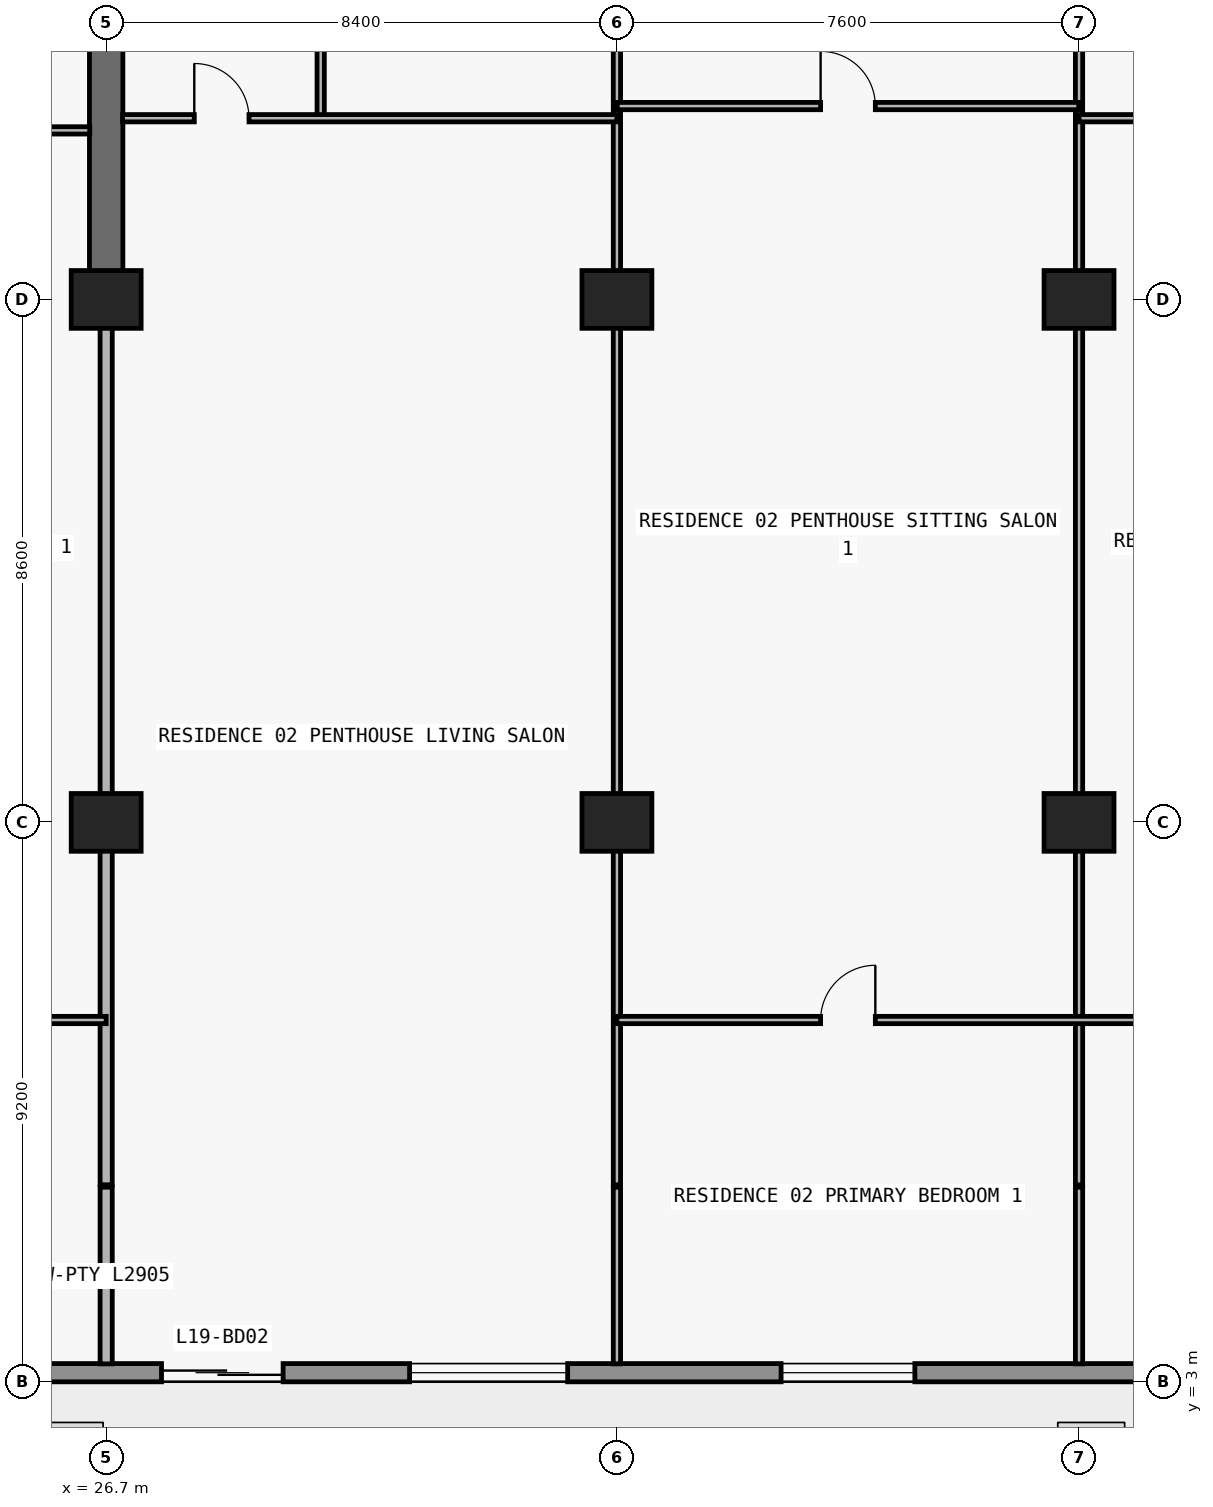
"""IFC4 building model, lengths in metres.
Left out: names, types, materials, properties, quantities, classifications, styles, units other than length and angle.
Written with IfcOpenShell. Run it as: python <this file> out.ifc"""

import sys

from ifc_helpers import new_model, si_unit, direction, frame, frame_2d, origin, origin_2d, place, context, subcontext, project, spatial, rectangle, extrude, element, fill, save


model = new_model("IFC4")
c1 = context("Model", 3, precision=1e-05, world=origin(), true_north=direction((0.0, 1.0)))
c2 = subcontext(c1, "Body", "Model", "MODEL_VIEW")
j1 = project(units=[si_unit("LENGTHUNIT", "METRE"), si_unit("PLANEANGLEUNIT", "RADIAN")], contexts=[c1])
p1 = place(None, origin())
s1 = spatial("IfcSite", under=j1, at=p1, CompositionType="ELEMENT")
p2 = place(p1, origin())
s2 = spatial("IfcBuilding", under=s1, at=p2, CompositionType="ELEMENT")
p3 = place(p2, frame((0.0, 0.0, 72.9)))
s3 = spatial("IfcBuildingStorey", under=s2, at=p3, CompositionType="ELEMENT", Elevation=72.9)
for number, where, z_axis, x_axis in (
    (1, (26.7, 12.2, 0.0), (0.0, 0.0, 1.0), (1.0, 0.0, 0.0)),
    (2, (35.1, 12.2, 0.0), (0.0, 0.0, 1.0), (1.0, 0.0, 0.0)),
    (3, (42.7, 12.2, 0.0), (0.0, 0.0, 1.0), (1.0, 0.0, 0.0)),
    (4, (26.7, 20.8, 0.0), (0.0, 0.0, 1.0), (1.0, 0.0, 0.0)),
    (5, (35.1, 20.8, 0.0), (0.0, 0.0, 1.0), (1.0, 0.0, 0.0)),
    (6, (42.7, 20.8, 0.0), (0.0, 0.0, 1.0), (1.0, 0.0, 0.0)),
):
    element("IfcColumn", number, at=place(p3, frame(where, z_axis=z_axis, x_axis=x_axis)), inside=s3, PredefinedType="COLUMN", context=c2, shape_type="SweptSolid", body=[
        extrude(rectangle(XDim=1.15, YDim=0.95, at=origin_2d()), origin(), (0.0, 0.0, 1.0), 3.05),
    ])
p4 = place(p3, frame((26.7, 20.8, 0.0), z_axis=(0.0, 0.0, 1.0), x_axis=(0.0, 1.0, 0.0)))
e7 = element("IfcWall", 7, at=p4, inside=s3, PredefinedType="SHEAR", context=c2, shape_type="SweptSolid", body=[
    extrude(rectangle(XDim=8.6, YDim=0.55, at=frame_2d((4.3, 0.0))), origin(), (0.0, 0.0, 1.0), 3.05),
])
p5 = place(p3, frame((72.7, 3.15, 0.0), z_axis=(0.0, 0.0, 1.0), x_axis=(-1.0, 0.0, 0.0)))
e8 = element("IfcWall", 8, at=p5, inside=s3, PredefinedType="STANDARD", context=c2, shape_type="SweptSolid", body=[
    extrude(rectangle(XDim=67.6, YDim=0.3, at=frame_2d((33.8, 0.0))), origin(), (0.0, 0.0, 1.0), 3.05),
])
p6 = place(p5, frame((59.89, 0.0, 0.0)))
e9 = element("IfcOpeningElement", 9, at=p6, cuts=e8, PredefinedType="OPENING", context=c2, shape_type="SweptSolid", body=[
    extrude(rectangle(XDim=2.0, YDim=2.3, at=frame_2d((1.0, 1.15))), frame((0.0, 0.16, 0.0), z_axis=(0.0, -1.0, 0.0), x_axis=(1.0, 0.0, 0.0)), (0.0, 0.0, 1.0), 0.32),
])
p7 = place(p5, frame((55.21, 0.0, 0.65)))
e10 = element("IfcOpeningElement", 10, at=p7, cuts=e8, PredefinedType="OPENING", context=c2, shape_type="SweptSolid", body=[
    extrude(rectangle(XDim=2.6, YDim=1.85, at=frame_2d((1.3, 0.925))), frame((0.0, 0.16, 0.0), z_axis=(0.0, -1.0, 0.0), x_axis=(1.0, 0.0, 0.0)), (0.0, 0.0, 1.0), 0.32),
])
p8 = place(p5, frame((49.1, 0.0, 0.85)))
e11 = element("IfcOpeningElement", 11, at=p8, cuts=e8, PredefinedType="OPENING", context=c2, shape_type="SweptSolid", body=[
    extrude(rectangle(XDim=2.2, YDim=1.55, at=frame_2d((1.1, 0.775))), frame((0.0, 0.16, 0.0), z_axis=(0.0, -1.0, 0.0), x_axis=(1.0, 0.0, 0.0)), (0.0, 0.0, 1.0), 0.32),
])
p9 = place(p5, frame((43.09, 0.0, 0.0)))
e12 = element("IfcOpeningElement", 12, at=p9, cuts=e8, PredefinedType="OPENING", context=c2, shape_type="SweptSolid", body=[
    extrude(rectangle(XDim=2.0, YDim=2.3, at=frame_2d((1.0, 1.15))), frame((0.0, 0.16, 0.0), z_axis=(0.0, -1.0, 0.0), x_axis=(1.0, 0.0, 0.0)), (0.0, 0.0, 1.0), 0.32),
])
p10 = place(p5, frame((38.41, 0.0, 0.65)))
e13 = element("IfcOpeningElement", 13, at=p10, cuts=e8, PredefinedType="OPENING", context=c2, shape_type="SweptSolid", body=[
    extrude(rectangle(XDim=2.6, YDim=1.85, at=frame_2d((1.3, 0.925))), frame((0.0, 0.16, 0.0), z_axis=(0.0, -1.0, 0.0), x_axis=(1.0, 0.0, 0.0)), (0.0, 0.0, 1.0), 0.32),
])
p11 = place(p5, frame((32.7, 0.0, 0.85)))
e14 = element("IfcOpeningElement", 14, at=p11, cuts=e8, PredefinedType="OPENING", context=c2, shape_type="SweptSolid", body=[
    extrude(rectangle(XDim=2.2, YDim=1.55, at=frame_2d((1.1, 0.775))), frame((0.0, 0.16, 0.0), z_axis=(0.0, -1.0, 0.0), x_axis=(1.0, 0.0, 0.0)), (0.0, 0.0, 1.0), 0.32),
])
p12 = place(p5, frame((24.7, 0.0, 0.85)))
e15 = element("IfcOpeningElement", 15, at=p12, cuts=e8, PredefinedType="OPENING", context=c2, shape_type="SweptSolid", body=[
    extrude(rectangle(XDim=2.2, YDim=1.55, at=frame_2d((1.1, 0.775))), frame((0.0, 0.16, 0.0), z_axis=(0.0, -1.0, 0.0), x_axis=(1.0, 0.0, 0.0)), (0.0, 0.0, 1.0), 0.32),
])
p13 = place(p5, frame((18.69, 0.0, 0.0)))
e16 = element("IfcOpeningElement", 16, at=p13, cuts=e8, PredefinedType="OPENING", context=c2, shape_type="SweptSolid", body=[
    extrude(rectangle(XDim=2.0, YDim=2.3, at=frame_2d((1.0, 1.15))), frame((0.0, 0.16, 0.0), z_axis=(0.0, -1.0, 0.0), x_axis=(1.0, 0.0, 0.0)), (0.0, 0.0, 1.0), 0.32),
])
p14 = place(p5, frame((14.01, 0.0, 0.65)))
e17 = element("IfcOpeningElement", 17, at=p14, cuts=e8, PredefinedType="OPENING", context=c2, shape_type="SweptSolid", body=[
    extrude(rectangle(XDim=2.6, YDim=1.85, at=frame_2d((1.3, 0.925))), frame((0.0, 0.16, 0.0), z_axis=(0.0, -1.0, 0.0), x_axis=(1.0, 0.0, 0.0)), (0.0, 0.0, 1.0), 0.32),
])
p15 = place(p5, frame((7.9, 0.0, 0.85)))
e18 = element("IfcOpeningElement", 18, at=p15, cuts=e8, PredefinedType="OPENING", context=c2, shape_type="SweptSolid", body=[
    extrude(rectangle(XDim=2.2, YDim=1.55, at=frame_2d((1.1, 0.775))), frame((0.0, 0.16, 0.0), z_axis=(0.0, -1.0, 0.0), x_axis=(1.0, 0.0, 0.0)), (0.0, 0.0, 1.0), 0.32),
])
p16 = place(p3, frame((26.7, 3.295, 0.0), z_axis=(0.0, 0.0, 1.0), x_axis=(0.0, 1.0, 0.0)))
e19 = element("IfcWall", 19, at=p16, inside=s3, PredefinedType="PARTITIONING", context=c2, shape_type="SweptSolid", body=[
    extrude(rectangle(XDim=2.905, YDim=0.2, at=frame_2d((1.453, 0.0))), origin(), (0.0, 0.0, 1.0), 3.05),
])
p17 = place(p3, frame((26.7, 6.24, 0.0), z_axis=(0.0, 0.0, 1.0), x_axis=(0.0, 1.0, 0.0)))
e20 = element("IfcWall", 20, at=p17, inside=s3, PredefinedType="PARTITIONING", context=c2, shape_type="SweptSolid", body=[
    extrude(rectangle(XDim=14.555, YDim=0.2, at=frame_2d((7.277, 0.0))), origin(), (0.0, 0.0, 1.0), 2.11),
])
p18 = place(p3, frame((30.228, 23.78, 0.0), z_axis=(0.0, 0.0, 1.0), x_axis=(0.0, 1.0, 0.0)))
e21 = element("IfcWall", 21, at=p18, inside=s3, PredefinedType="PARTITIONING", context=c2, shape_type="SweptSolid", body=[
    extrude(rectangle(XDim=4.8, YDim=0.12, at=frame_2d((2.4, 0.0))), origin(), (0.0, 0.0, 1.0), 3.05),
])
p19 = place(p18, frame((1.95, 0.0, 0.0)))
e22 = element("IfcOpeningElement", 22, at=p19, cuts=e21, PredefinedType="OPENING", context=c2, shape_type="SweptSolid", body=[
    extrude(rectangle(XDim=0.9, YDim=2.15, at=frame_2d((0.45, 1.075))), frame((0.0, 0.07, 0.0), z_axis=(0.0, -1.0, 0.0), x_axis=(1.0, 0.0, 0.0)), (0.0, 0.0, 1.0), 0.14),
])
p20 = place(p3, frame((35.1, 3.295, 0.0), z_axis=(0.0, 0.0, 1.0), x_axis=(0.0, 1.0, 0.0)))
e23 = element("IfcWall", 23, at=p20, inside=s3, PredefinedType="PARTITIONING", context=c2, shape_type="SweptSolid", body=[
    extrude(rectangle(XDim=2.905, YDim=0.12, at=frame_2d((1.453, 0.0))), origin(), (0.0, 0.0, 1.0), 3.05),
])
p21 = place(p3, frame((35.1, 6.24, 0.0), z_axis=(0.0, 0.0, 1.0), x_axis=(0.0, 1.0, 0.0)))
e24 = element("IfcWall", 24, at=p21, inside=s3, PredefinedType="PARTITIONING", context=c2, shape_type="SweptSolid", body=[
    extrude(rectangle(XDim=27.96, YDim=0.12, at=frame_2d((13.98, 0.0))), origin(), (0.0, 0.0, 1.0), 2.11),
])
p22 = place(p21, frame((19.49, 0.0, 0.0)))
e25 = element("IfcOpeningElement", 25, at=p22, cuts=e24, PredefinedType="OPENING", context=c2, shape_type="SweptSolid", body=[
    extrude(rectangle(XDim=0.9, YDim=2.06, at=frame_2d((0.45, 1.03))), frame((0.0, 0.07, 0.0), z_axis=(0.0, -1.0, 0.0), x_axis=(1.0, 0.0, 0.0)), (0.0, 0.0, 1.0), 0.14),
])
p23 = place(p3, frame((42.7, 3.295, 0.0), z_axis=(0.0, 0.0, 1.0), x_axis=(0.0, 1.0, 0.0)))
e26 = element("IfcWall", 26, at=p23, inside=s3, PredefinedType="PARTITIONING", context=c2, shape_type="SweptSolid", body=[
    extrude(rectangle(XDim=2.905, YDim=0.12, at=frame_2d((1.453, 0.0))), origin(), (0.0, 0.0, 1.0), 3.05),
])
p24 = place(p3, frame((42.7, 6.24, 0.0), z_axis=(0.0, 0.0, 1.0), x_axis=(0.0, 1.0, 0.0)))
e27 = element("IfcWall", 27, at=p24, inside=s3, PredefinedType="PARTITIONING", context=c2, shape_type="SweptSolid", body=[
    extrude(rectangle(XDim=27.96, YDim=0.12, at=frame_2d((13.98, 0.0))), origin(), (0.0, 0.0, 1.0), 2.11),
])
p25 = place(p24, frame((19.49, 0.0, 0.0)))
e28 = element("IfcOpeningElement", 28, at=p25, cuts=e27, PredefinedType="OPENING", context=c2, shape_type="SweptSolid", body=[
    extrude(rectangle(XDim=0.9, YDim=2.06, at=frame_2d((0.45, 1.03))), frame((0.0, 0.07, 0.0), z_axis=(0.0, -1.0, 0.0), x_axis=(1.0, 0.0, 0.0)), (0.0, 0.0, 1.0), 0.14),
])
p26 = place(p3, frame((18.3, 8.95, 0.0), z_axis=(0.0, 0.0, 1.0), x_axis=(1.0, 0.0, 0.0)))
e29 = element("IfcWall", 29, at=p26, inside=s3, PredefinedType="PARTITIONING", context=c2, shape_type="SweptSolid", body=[
    extrude(rectangle(XDim=8.4, YDim=0.12, at=frame_2d((4.2, 0.0))), origin(), (0.0, 0.0, 1.0), 3.05),
])
p27 = place(p26, frame((3.75, 0.0, 0.0)))
e30 = element("IfcOpeningElement", 30, at=p27, cuts=e29, PredefinedType="OPENING", context=c2, shape_type="SweptSolid", body=[
    extrude(rectangle(XDim=0.9, YDim=2.15, at=frame_2d((0.45, 1.075))), frame((0.0, 0.07, 0.0), z_axis=(0.0, -1.0, 0.0), x_axis=(1.0, 0.0, 0.0)), (0.0, 0.0, 1.0), 0.14),
])
p28 = place(p3, frame((35.1, 8.95, 0.0), z_axis=(0.0, 0.0, 1.0), x_axis=(1.0, 0.0, 0.0)))
e31 = element("IfcWall", 31, at=p28, inside=s3, PredefinedType="PARTITIONING", context=c2, shape_type="SweptSolid", body=[
    extrude(rectangle(XDim=16.0, YDim=0.12, at=frame_2d((8.0, 0.0))), origin(), (0.0, 0.0, 1.0), 3.05),
])
p29 = place(p28, frame((3.35, 0.0, 0.0)))
e32 = element("IfcOpeningElement", 32, at=p29, cuts=e31, PredefinedType="OPENING", context=c2, shape_type="SweptSolid", body=[
    extrude(rectangle(XDim=0.9, YDim=2.15, at=frame_2d((0.45, 1.075))), frame((0.0, 0.07, 0.0), z_axis=(0.0, -1.0, 0.0), x_axis=(1.0, 0.0, 0.0)), (0.0, 0.0, 1.0), 0.14),
])
p30 = place(p28, frame((11.35, 0.0, 0.0)))
e33 = element("IfcOpeningElement", 33, at=p30, cuts=e31, PredefinedType="OPENING", context=c2, shape_type="SweptSolid", body=[
    extrude(rectangle(XDim=0.9, YDim=2.15, at=frame_2d((0.45, 1.075))), frame((0.0, 0.07, 0.0), z_axis=(0.0, -1.0, 0.0), x_axis=(1.0, 0.0, 0.0)), (0.0, 0.0, 1.0), 0.14),
])
p31 = place(p3, frame((18.305, 23.58, 0.0), z_axis=(0.0, 0.0, 1.0), x_axis=(1.0, 0.0, 0.0)))
e34 = element("IfcWall", 34, at=p31, inside=s3, PredefinedType="PARTITIONING", context=c2, shape_type="SweptSolid", body=[
    extrude(rectangle(XDim=8.125, YDim=0.12, at=frame_2d((4.062, 0.0))), origin(), (0.0, 0.0, 1.0), 3.05),
])
p32 = place(p31, frame((3.613, 0.0, 0.0)))
e35 = element("IfcOpeningElement", 35, at=p32, cuts=e34, PredefinedType="OPENING", context=c2, shape_type="SweptSolid", body=[
    extrude(rectangle(XDim=0.9, YDim=2.15, at=frame_2d((0.45, 1.075))), frame((0.0, 0.07, 0.0), z_axis=(0.0, -1.0, 0.0), x_axis=(1.0, 0.0, 0.0)), (0.0, 0.0, 1.0), 0.14),
])
p33 = place(p3, frame((26.97, 23.78, 0.0), z_axis=(0.0, 0.0, 1.0), x_axis=(1.0, 0.0, 0.0)))
e36 = element("IfcWall", 36, at=p33, inside=s3, PredefinedType="PARTITIONING", context=c2, shape_type="SweptSolid", body=[
    extrude(rectangle(XDim=8.13, YDim=0.12, at=frame_2d((4.065, 0.0))), origin(), (0.0, 0.0, 1.0), 3.05),
])
p34 = place(p33, frame((1.179, 0.0, 0.0)))
e37 = element("IfcOpeningElement", 37, at=p34, cuts=e36, PredefinedType="OPENING", context=c2, shape_type="SweptSolid", body=[
    extrude(rectangle(XDim=0.9, YDim=2.15, at=frame_2d((0.45, 1.075))), frame((0.0, 0.07, 0.0), z_axis=(0.0, -1.0, 0.0), x_axis=(1.0, 0.0, 0.0)), (0.0, 0.0, 1.0), 0.14),
])
p35 = place(p3, frame((42.7, 23.78, 0.0), z_axis=(0.0, 0.0, 1.0), x_axis=(1.0, 0.0, 0.0)))
e38 = element("IfcWall", 38, at=p35, inside=s3, PredefinedType="PARTITIONING", context=c2, shape_type="SweptSolid", body=[
    extrude(rectangle(XDim=8.13, YDim=0.12, at=frame_2d((4.065, 0.0))), origin(), (0.0, 0.0, 1.0), 3.05),
])
p36 = place(p35, frame((3.615, 0.0, 0.0)))
e39 = element("IfcOpeningElement", 39, at=p36, cuts=e38, PredefinedType="OPENING", context=c2, shape_type="SweptSolid", body=[
    extrude(rectangle(XDim=0.9, YDim=2.15, at=frame_2d((0.45, 1.075))), frame((0.0, 0.07, 0.0), z_axis=(0.0, -1.0, 0.0), x_axis=(1.0, 0.0, 0.0)), (0.0, 0.0, 1.0), 0.14),
])
p37 = place(p3, frame((35.105, 23.98, 0.0), z_axis=(0.0, 0.0, 1.0), x_axis=(1.0, 0.0, 0.0)))
e40 = element("IfcWall", 40, at=p37, inside=s3, PredefinedType="PARTITIONING", context=c2, shape_type="SweptSolid", body=[
    extrude(rectangle(XDim=7.59, YDim=0.12, at=frame_2d((3.795, 0.0))), origin(), (0.0, 0.0, 1.0), 3.05),
])
p38 = place(p37, frame((3.345, 0.0, 0.0)))
e41 = element("IfcOpeningElement", 41, at=p38, cuts=e40, PredefinedType="OPENING", context=c2, shape_type="SweptSolid", body=[
    extrude(rectangle(XDim=0.9, YDim=2.15, at=frame_2d((0.45, 1.075))), frame((0.0, 0.07, 0.0), z_axis=(0.0, -1.0, 0.0), x_axis=(1.0, 0.0, 0.0)), (0.0, 0.0, 1.0), 0.14),
])
p39 = place(p9, origin())
e42 = element("IfcDoor", 42, at=p39, inside=s3, OperationType="DOUBLE_DOOR_SLIDING", PredefinedType="DOOR", context=c2, shape_type="SweptSolid", body=[
    extrude(rectangle(XDim=2.0, YDim=2.3, at=frame_2d((1.0, 1.15))), frame((0.0, 0.025, 0.0), z_axis=(0.0, -1.0, 0.0), x_axis=(1.0, 0.0, 0.0)), (0.0, 0.0, 1.0), 0.05),
])
fill(e12, e42)
p40 = place(p10, origin())
e43 = element("IfcWindow", 43, at=p40, inside=s3, PartitioningType="SINGLE_PANEL", PredefinedType="WINDOW", context=c2, shape_type="SweptSolid", body=[
    extrude(rectangle(XDim=2.6, YDim=1.85, at=frame_2d((1.3, 0.925))), frame((0.0, 0.03, 0.0), z_axis=(0.0, -1.0, 0.0), x_axis=(1.0, 0.0, 0.0)), (0.0, 0.0, 1.0), 0.06),
])
fill(e13, e43)
p41 = place(p11, origin())
e44 = element("IfcWindow", 44, at=p41, inside=s3, PartitioningType="SINGLE_PANEL", PredefinedType="WINDOW", context=c2, shape_type="SweptSolid", body=[
    extrude(rectangle(XDim=2.2, YDim=1.55, at=frame_2d((1.1, 0.775))), frame((0.0, 0.03, 0.0), z_axis=(0.0, -1.0, 0.0), x_axis=(1.0, 0.0, 0.0)), (0.0, 0.0, 1.0), 0.06),
])
fill(e14, e44)
p42 = place(p34, origin())
e45 = element("IfcDoor", 45, at=p42, inside=s3, OperationType="SINGLE_SWING_LEFT", PredefinedType="DOOR", context=c2, shape_type="SweptSolid", body=[
    extrude(rectangle(XDim=0.9, YDim=2.15, at=frame_2d((0.45, 1.075))), frame((0.0, 0.025, 0.0), z_axis=(0.0, -1.0, 0.0), x_axis=(1.0, 0.0, 0.0)), (0.0, 0.0, 1.0), 0.05),
])
fill(e37, e45)
p43 = place(p38, origin())
e46 = element("IfcDoor", 46, at=p43, inside=s3, OperationType="SINGLE_SWING_LEFT", PredefinedType="DOOR", context=c2, shape_type="SweptSolid", body=[
    extrude(rectangle(XDim=0.9, YDim=2.15, at=frame_2d((0.45, 1.075))), frame((0.0, 0.025, 0.0), z_axis=(0.0, -1.0, 0.0), x_axis=(1.0, 0.0, 0.0)), (0.0, 0.0, 1.0), 0.05),
])
fill(e41, e46)
p44 = place(p29, origin())
e47 = element("IfcDoor", 47, at=p44, inside=s3, OperationType="SINGLE_SWING_RIGHT", PredefinedType="DOOR", context=c2, shape_type="SweptSolid", body=[
    extrude(rectangle(XDim=0.9, YDim=2.15, at=frame_2d((0.45, 1.075))), frame((0.0, 0.025, 0.0), z_axis=(0.0, -1.0, 0.0), x_axis=(1.0, 0.0, 0.0)), (0.0, 0.0, 1.0), 0.05),
])
fill(e32, e47)
save(model, sys.argv[1])
